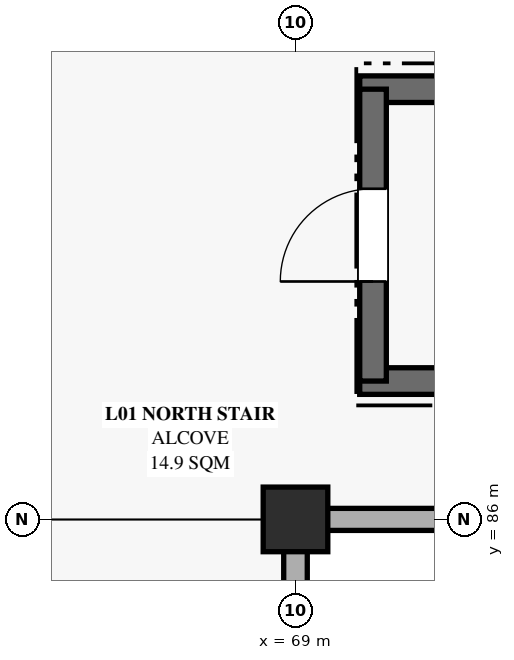
"""IFC4 building model, lengths in metres.
Left out: names, types, materials, properties, quantities, classifications, styles, units other than length and angle.
Written with IfcOpenShell. Run it as: python <this file> out.ifc"""

import sys

from ifc_helpers import new_model, si_unit, direction, frame, frame_2d, origin, origin_2d, place, context, subcontext, project, spatial, rectangle, extrude, element, fill, save


model = new_model("IFC4")
c1 = context("Model", 3, precision=1e-05, world=origin(), true_north=direction((0.0, 1.0)))
c2 = subcontext(c1, "Body", "Model", "MODEL_VIEW")
j1 = project(units=[si_unit("LENGTHUNIT", "METRE"), si_unit("PLANEANGLEUNIT", "RADIAN")], contexts=[c1])
p1 = place(None, origin())
s1 = spatial("IfcSite", under=j1, at=p1, CompositionType="ELEMENT")
p2 = place(p1, origin())
s2 = spatial("IfcBuilding", under=s1, at=p2, CompositionType="ELEMENT")
p3 = place(p2, frame((0.0, 0.0, 5.4)))
s3 = spatial("IfcBuildingStorey", under=s2, at=p3, CompositionType="ELEMENT", Elevation=5.4)
p4 = place(p3, frame((69.0, 86.0, 0.0), z_axis=(0.0, 0.0, 1.0), x_axis=(1.0, 0.0, 0.0)))
e1 = element("IfcColumn", 1, at=p4, inside=s3, PredefinedType="COLUMN", context=c2, shape_type="SweptSolid", body=[
    extrude(rectangle(XDim=0.85, YDim=0.85, at=origin_2d()), origin(), (0.0, 0.0, 1.0), 5.04),
])
p5 = place(p3, frame((69.0, 85.59, 0.0), z_axis=(0.0, 0.0, 1.0), x_axis=(0.0, -1.0, 0.0)))
e2 = element("IfcWall", 2, at=p5, inside=s3, PredefinedType="SOLIDWALL", context=c2, shape_type="SweptSolid", body=[
    extrude(rectangle(XDim=6.38, YDim=0.31, at=frame_2d((3.19, 0.0))), origin(), (0.0, 0.0, 1.0), 3.54),
])
p6 = place(p5, frame((2.34, 0.0, 0.9)))
e3 = element("IfcOpeningElement", 3, at=p6, cuts=e2, PredefinedType="OPENING", context=c2, shape_type="SweptSolid", body=[
    extrude(rectangle(XDim=1.7, YDim=2.0, at=frame_2d((0.85, 1.0))), frame((0.0, 0.165, 0.0), z_axis=(0.0, -1.0, 0.0), x_axis=(1.0, 0.0, 0.0)), (0.0, 0.0, 1.0), 0.33),
])
p7 = place(p3, frame((75.79, 86.0, 0.0), z_axis=(0.0, 0.0, 1.0), x_axis=(-1.0, 0.0, 0.0)))
e4 = element("IfcWall", 4, at=p7, inside=s3, PredefinedType="SOLIDWALL", context=c2, shape_type="SweptSolid", body=[
    extrude(rectangle(XDim=6.38, YDim=0.29, at=frame_2d((3.19, 0.0))), origin(), (0.0, 0.0, 1.0), 3.54),
])
p8 = place(p7, frame((2.54, 0.0, 0.9)))
e5 = element("IfcOpeningElement", 5, at=p8, cuts=e4, PredefinedType="OPENING", context=c2, shape_type="SweptSolid", body=[
    extrude(rectangle(XDim=1.3, YDim=1.9, at=frame_2d((0.65, 0.95))), frame((0.0, 0.155, 0.0), z_axis=(0.0, -1.0, 0.0), x_axis=(1.0, 0.0, 0.0)), (0.0, 0.0, 1.0), 0.31),
])
for number, where, z_axis, x_axis in (
    (6, (77.855, 87.82, 0.0), (0.0, 0.0, 1.0), (-1.0, 0.0, 0.0)),
    (7, (69.845, 91.66, 0.0), (0.0, 0.0, 1.0), (1.0, 0.0, 0.0)),
):
    element("IfcWall", number, at=place(p3, frame(where, z_axis=z_axis, x_axis=x_axis)), inside=s3, PredefinedType="SHEAR", context=c2, shape_type="SweptSolid", body=[
        extrude(rectangle(XDim=8.01, YDim=0.35, at=frame_2d((4.005, 0.0))), origin(), (0.0, 0.0, 1.0), 4.77),
    ])
p9 = place(p3, frame((70.02, 87.82, 0.0), z_axis=(0.0, 0.0, 1.0), x_axis=(0.0, 1.0, 0.0)))
e8 = element("IfcWall", 8, at=p9, inside=s3, PredefinedType="SHEAR", context=c2, shape_type="SweptSolid", body=[
    extrude(rectangle(XDim=3.84, YDim=0.35, at=frame_2d((1.92, 0.0))), origin(), (0.0, 0.0, 1.0), 4.77),
])
p10 = place(p9, frame((1.31, 0.0, 0.0)))
e9 = element("IfcOpeningElement", 9, at=p10, cuts=e8, PredefinedType="OPENING", context=c2, shape_type="SweptSolid", body=[
    extrude(rectangle(XDim=1.22, YDim=2.12, at=frame_2d((0.61, 1.06))), frame((0.0, 0.185, 0.0), z_axis=(0.0, -1.0, 0.0), x_axis=(1.0, 0.0, 0.0)), (0.0, 0.0, 1.0), 0.37),
])
p11 = place(p10, origin())
e10 = element("IfcDoor", 10, at=p11, inside=s3, OperationType="SINGLE_SWING_LEFT", PredefinedType="DOOR", context=c2, shape_type="SweptSolid", body=[
    extrude(rectangle(XDim=1.22, YDim=2.12, at=frame_2d((0.61, 1.06))), frame((0.0, 0.025, 0.0), z_axis=(0.0, -1.0, 0.0), x_axis=(1.0, 0.0, 0.0)), (0.0, 0.0, 1.0), 0.05),
])
fill(e9, e10)
save(model, sys.argv[1])
